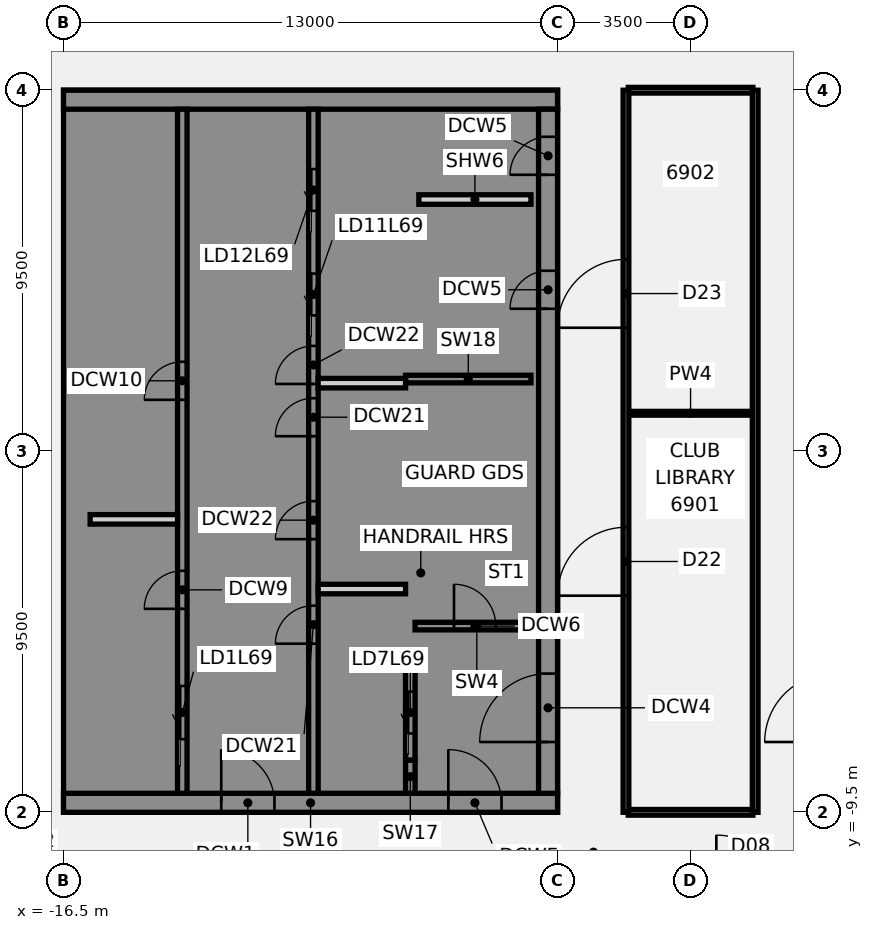
"""IFC4 building model, lengths in metres.
Left out: names, types, materials, properties, quantities, classifications, styles, units other than length and angle.
Written with IfcOpenShell. Run it as: python <this file> out.ifc"""

import sys

from ifc_helpers import new_model, si_unit, direction, frame, frame_2d, origin, place, context, subcontext, project, spatial, polyline, rectangle, outline, extrude, element, fill, save


model = new_model("IFC4")
c1 = context("Model", 3, precision=1e-05, world=origin(), true_north=direction((0.0, 1.0)))
c2 = subcontext(c1, "Body", "Model", "MODEL_VIEW")
j1 = project(units=[si_unit("LENGTHUNIT", "METRE"), si_unit("PLANEANGLEUNIT", "RADIAN")], contexts=[c1])
p1 = place(None, origin())
s1 = spatial("IfcSite", under=j1, at=p1, CompositionType="ELEMENT")
p2 = place(p1, origin())
s2 = spatial("IfcBuilding", under=s1, at=p2, CompositionType="ELEMENT")
p3 = place(p2, frame((0.0, 0.0, 271.2)))
s3 = spatial("IfcBuildingStorey", under=s2, at=p3, CompositionType="ELEMENT", Elevation=271.2)
p4 = place(p3, frame((-1.64, -9.5, 0.0), z_axis=(0.0, 0.0, 1.0), x_axis=(1.0, 0.0, 0.0)))
e1 = element("IfcWall", 1, at=p4, inside=s3, PredefinedType="PARTITIONING", context=c2, shape_type="SweptSolid", body=[
    extrude(rectangle(XDim=3.28, YDim=0.15, at=frame_2d((1.64, 0.0))), origin(), (0.0, 0.0, 1.0), 2.864),
])
p5 = place(p3, frame((-1.64, 1.0, 0.0), z_axis=(0.0, 0.0, 1.0), x_axis=(1.0, 0.0, 0.0)))
e2 = element("IfcWall", 2, at=p5, inside=s3, PredefinedType="PARTITIONING", context=c2, shape_type="SweptSolid", body=[
    extrude(rectangle(XDim=3.28, YDim=0.1, at=frame_2d((1.64, 0.0))), origin(), (0.0, 0.0, 1.0), 2.864),
])
p6 = place(p3, frame((-1.64, 9.5, 0.0), z_axis=(0.0, 0.0, 1.0), x_axis=(1.0, 0.0, 0.0)))
e3 = element("IfcWall", 3, at=p6, inside=s3, PredefinedType="PARTITIONING", context=c2, shape_type="SweptSolid", body=[
    extrude(rectangle(XDim=3.28, YDim=0.15, at=frame_2d((1.64, 0.0))), origin(), (0.0, 0.0, 1.0), 2.864),
])
p7 = place(p3, frame((-1.7, -9.5, 0.0), z_axis=(0.0, 0.0, 1.0), x_axis=(0.0, 1.0, 0.0)))
e4 = element("IfcWall", 4, at=p7, inside=s3, PredefinedType="PARTITIONING", context=c2, shape_type="SweptSolid", body=[
    extrude(rectangle(XDim=19.0, YDim=0.15, at=frame_2d((9.5, 0.0))), origin(), (0.0, 0.0, 1.0), 2.864),
])
p8 = place(p7, frame((5.7, 0.0, 0.0)))
e5 = element("IfcOpeningElement", 5, at=p8, cuts=e4, PredefinedType="OPENING", context=c2, shape_type="SweptSolid", body=[
    extrude(rectangle(XDim=1.8, YDim=2.1, at=frame_2d((0.9, 1.05))), frame((0.0, 0.085, 0.0), z_axis=(0.0, -1.0, 0.0), x_axis=(1.0, 0.0, 0.0)), (0.0, 0.0, 1.0), 0.17),
])
p9 = place(p7, frame((12.75, 0.0, 0.0)))
e6 = element("IfcOpeningElement", 6, at=p9, cuts=e4, PredefinedType="OPENING", context=c2, shape_type="SweptSolid", body=[
    extrude(rectangle(XDim=1.8, YDim=2.1, at=frame_2d((0.9, 1.05))), frame((0.0, 0.085, 0.0), z_axis=(0.0, -1.0, 0.0), x_axis=(1.0, 0.0, 0.0)), (0.0, 0.0, 1.0), 0.17),
])
p10 = place(p3, frame((1.7, -9.5, 0.0), z_axis=(0.0, 0.0, 1.0), x_axis=(0.0, 1.0, 0.0)))
e7 = element("IfcWall", 7, at=p10, inside=s3, PredefinedType="PARTITIONING", context=c2, shape_type="SweptSolid", body=[
    extrude(rectangle(XDim=19.0, YDim=0.15, at=frame_2d((9.5, 0.0))), origin(), (0.0, 0.0, 1.0), 2.864),
])
p11 = place(p3, frame((-16.5, -9.25, 0.0), z_axis=(0.0, 0.0, 1.0), x_axis=(1.0, 0.0, 0.0)))
e8 = element("IfcWall", 8, at=p11, inside=s3, PredefinedType="SHEAR", context=c2, shape_type="SweptSolid", body=[
    extrude(rectangle(XDim=13.0, YDim=0.5, at=frame_2d((6.5, 0.0))), origin(), (0.0, 0.0, 1.0), 3.46),
])
p12 = place(p11, frame((4.15, 0.0, 0.0)))
e9 = element("IfcOpeningElement", 9, at=p12, cuts=e8, PredefinedType="OPENING", context=c2, shape_type="SweptSolid", body=[
    extrude(rectangle(XDim=1.4, YDim=2.1, at=frame_2d((0.7, 1.05))), frame((0.0, 0.26, 0.0), z_axis=(0.0, -1.0, 0.0), x_axis=(1.0, 0.0, 0.0)), (0.0, 0.0, 1.0), 0.52),
])
p13 = place(p11, frame((10.125, 0.0, 0.0)))
e10 = element("IfcOpeningElement", 10, at=p13, cuts=e8, PredefinedType="OPENING", context=c2, shape_type="SweptSolid", body=[
    extrude(rectangle(XDim=1.4, YDim=2.1, at=frame_2d((0.7, 1.05))), frame((0.0, 0.26, 0.0), z_axis=(0.0, -1.0, 0.0), x_axis=(1.0, 0.0, 0.0)), (0.0, 0.0, 1.0), 0.52),
])
p14 = place(p3, origin())
e11 = element("IfcWall", 11, at=p14, inside=s3, PredefinedType="SHEAR", context=c2, shape_type="SweptSolid", body=[
    extrude(outline(polyline([(-13.5, -8.125), (-16.0, -8.125), (-16.0, -5.625), (-13.5, -5.625), (-13.5, -5.375), (-16.0, -5.375), (-16.0, 5.375), (-13.5, 5.375), (-13.5, 5.625), (-16.0, 5.625), (-16.0, 8.125), (-13.5, 8.125), (-13.5, 9.0), (-16.0, 9.0), (-16.5, 9.0), (-16.5, -9.0), (-16.0, -9.0), (-13.5, -9.0), (-13.5, -8.125)])), origin(), (0.0, 0.0, 1.0), 3.46),
])
p15 = place(p3, frame((-16.5, 9.25, 0.0), z_axis=(0.0, 0.0, 1.0), x_axis=(1.0, 0.0, 0.0)))
e12 = element("IfcWall", 12, at=p15, inside=s3, PredefinedType="SHEAR", context=c2, shape_type="SweptSolid", body=[
    extrude(rectangle(XDim=13.0, YDim=0.5, at=frame_2d((6.5, 0.0))), origin(), (0.0, 0.0, 1.0), 3.46),
])
p16 = place(p3, origin())
e13 = element("IfcWall", 13, at=p16, inside=s3, PredefinedType="SHEAR", context=c2, shape_type="SweptSolid", body=[
    extrude(outline(polyline([(-9.8, -5.375), (-9.8, -5.625), (-7.5, -5.625), (-7.25, -5.625), (-7.25, 9.0), (-7.5, 9.0), (-9.8, 9.0), (-9.8, 8.125), (-7.5, 8.125), (-7.5, 5.625), (-9.8, 5.625), (-9.8, 5.375), (-7.5, 5.375), (-7.5, 2.875), (-9.8, 2.875), (-9.8, 2.625), (-7.5, 2.625), (-7.5, -5.375), (-9.8, -5.375)])), origin(), (0.0, 0.0, 1.0), 3.46),
])
p17 = place(p3, origin())
e14 = element("IfcWall", 14, at=p17, inside=s3, PredefinedType="SHEAR", context=c2, shape_type="SweptSolid", body=[
    extrude(outline(polyline([(-7.5, -8.125), (-9.55, -8.125), (-9.55, -5.625), (-9.8, -5.625), (-9.8, -8.125), (-9.8, -9.0), (-7.5, -9.0), (-7.5, -8.125)])), origin(), (0.0, 0.0, 1.0), 3.46),
])
p18 = place(p3, frame((-7.375, -9.0, 0.0), z_axis=(0.0, 0.0, 1.0), x_axis=(0.0, 1.0, 0.0)))
e15 = element("IfcWall", 15, at=p18, inside=s3, PredefinedType="SHEAR", context=c2, shape_type="SweptSolid", body=[
    extrude(rectangle(XDim=0.875, YDim=0.25, at=frame_2d((0.438, 0.0))), origin(), (0.0, 0.0, 1.0), 3.46),
])
p19 = place(p3, frame((-7.5, 1.9, 0.0), z_axis=(0.0, 0.0, 1.0), x_axis=(1.0, 0.0, 0.0)))
e16 = element("IfcWall", 16, at=p19, inside=s3, PredefinedType="SHEAR", context=c2, shape_type="SweptSolid", body=[
    extrude(rectangle(XDim=3.3, YDim=0.2, at=frame_2d((1.65, 0.0))), origin(), (0.0, 0.0, 1.0), 3.46),
])
p20 = place(p3, frame((-13.375, -9.0, 0.0), z_axis=(0.0, 0.0, 1.0), x_axis=(0.0, 1.0, 0.0)))
e17 = element("IfcWall", 17, at=p20, inside=s3, PredefinedType="SHEAR", context=c2, shape_type="SweptSolid", body=[
    extrude(rectangle(XDim=18.0, YDim=0.25, at=frame_2d((9.0, 0.0))), origin(), (0.0, 0.0, 1.0), 3.46),
])
p21 = place(p20, frame((1.425, 0.0, 0.0)))
e18 = element("IfcOpeningElement", 18, at=p21, cuts=e17, PredefinedType="OPENING", context=c2, shape_type="SweptSolid", body=[
    extrude(rectangle(XDim=1.4, YDim=2.1, at=frame_2d((0.7, 1.05))), frame((0.0, 0.135, 0.0), z_axis=(0.0, -1.0, 0.0), x_axis=(1.0, 0.0, 0.0)), (0.0, 0.0, 1.0), 0.27),
])
p22 = place(p20, frame((4.854, 0.0, 0.0)))
e19 = element("IfcOpeningElement", 19, at=p22, cuts=e17, PredefinedType="OPENING", context=c2, shape_type="SweptSolid", body=[
    extrude(rectangle(XDim=1.0, YDim=2.1, at=frame_2d((0.5, 1.05))), frame((0.0, 0.135, 0.0), z_axis=(0.0, -1.0, 0.0), x_axis=(1.0, 0.0, 0.0)), (0.0, 0.0, 1.0), 0.27),
])
p23 = place(p20, frame((10.354, 0.0, 0.0)))
e20 = element("IfcOpeningElement", 20, at=p23, cuts=e17, PredefinedType="OPENING", context=c2, shape_type="SweptSolid", body=[
    extrude(rectangle(XDim=1.0, YDim=2.1, at=frame_2d((0.5, 1.05))), frame((0.0, 0.135, 0.0), z_axis=(0.0, -1.0, 0.0), x_axis=(1.0, 0.0, 0.0)), (0.0, 0.0, 1.0), 0.27),
])
p24 = place(p3, frame((-9.925, -9.0, 0.0), z_axis=(0.0, 0.0, 1.0), x_axis=(0.0, 1.0, 0.0)))
e21 = element("IfcWall", 21, at=p24, inside=s3, PredefinedType="SHEAR", context=c2, shape_type="SweptSolid", body=[
    extrude(rectangle(XDim=18.0, YDim=0.25, at=frame_2d((9.0, 0.0))), origin(), (0.0, 0.0, 1.0), 3.46),
])
p25 = place(p24, frame((12.575, 0.0, 0.0)))
e22 = element("IfcOpeningElement", 22, at=p25, cuts=e21, PredefinedType="OPENING", context=c2, shape_type="SweptSolid", body=[
    extrude(rectangle(XDim=1.1, YDim=2.1, at=frame_2d((0.55, 1.05))), frame((0.0, 0.135, 0.0), z_axis=(0.0, -1.0, 0.0), x_axis=(1.0, 0.0, 0.0)), (0.0, 0.0, 1.0), 0.27),
])
p26 = place(p24, frame((15.325, 0.0, 0.0)))
e23 = element("IfcOpeningElement", 23, at=p26, cuts=e21, PredefinedType="OPENING", context=c2, shape_type="SweptSolid", body=[
    extrude(rectangle(XDim=1.1, YDim=2.1, at=frame_2d((0.55, 1.05))), frame((0.0, 0.135, 0.0), z_axis=(0.0, -1.0, 0.0), x_axis=(1.0, 0.0, 0.0)), (0.0, 0.0, 1.0), 0.27),
])
p27 = place(p24, frame((3.938, 0.0, 0.0)))
e24 = element("IfcOpeningElement", 24, at=p27, cuts=e21, PredefinedType="OPENING", context=c2, shape_type="SweptSolid", body=[
    extrude(rectangle(XDim=1.0, YDim=2.1, at=frame_2d((0.5, 1.05))), frame((0.0, 0.135, 0.0), z_axis=(0.0, -1.0, 0.0), x_axis=(1.0, 0.0, 0.0)), (0.0, 0.0, 1.0), 0.27),
])
p28 = place(p24, frame((6.688, 0.0, 0.0)))
e25 = element("IfcOpeningElement", 25, at=p28, cuts=e21, PredefinedType="OPENING", context=c2, shape_type="SweptSolid", body=[
    extrude(rectangle(XDim=1.0, YDim=2.1, at=frame_2d((0.5, 1.05))), frame((0.0, 0.135, 0.0), z_axis=(0.0, -1.0, 0.0), x_axis=(1.0, 0.0, 0.0)), (0.0, 0.0, 1.0), 0.27),
])
p29 = place(p24, frame((9.396, 0.0, 0.0)))
e26 = element("IfcOpeningElement", 26, at=p29, cuts=e21, PredefinedType="OPENING", context=c2, shape_type="SweptSolid", body=[
    extrude(rectangle(XDim=1.0, YDim=2.1, at=frame_2d((0.5, 1.05))), frame((0.0, 0.135, 0.0), z_axis=(0.0, -1.0, 0.0), x_axis=(1.0, 0.0, 0.0)), (0.0, 0.0, 1.0), 0.27),
])
p30 = place(p24, frame((10.771, 0.0, 0.0)))
e27 = element("IfcOpeningElement", 27, at=p30, cuts=e21, PredefinedType="OPENING", context=c2, shape_type="SweptSolid", body=[
    extrude(rectangle(XDim=1.0, YDim=2.1, at=frame_2d((0.5, 1.05))), frame((0.0, 0.135, 0.0), z_axis=(0.0, -1.0, 0.0), x_axis=(1.0, 0.0, 0.0)), (0.0, 0.0, 1.0), 0.27),
])
p31 = place(p3, frame((-7.375, -8.125, 0.0), z_axis=(0.0, 0.0, 1.0), x_axis=(0.0, 1.0, 0.0)))
e28 = element("IfcWall", 28, at=p31, inside=s3, PredefinedType="SHEAR", context=c2, shape_type="SweptSolid", body=[
    extrude(rectangle(XDim=2.5, YDim=0.25, at=frame_2d((1.25, 0.0))), origin(), (0.0, 0.0, 1.0), 3.46),
])
p32 = place(p31, frame((0.7, 0.0, 0.0)))
e29 = element("IfcOpeningElement", 29, at=p32, cuts=e28, PredefinedType="OPENING", context=c2, shape_type="SweptSolid", body=[
    extrude(rectangle(XDim=1.1, YDim=2.1, at=frame_2d((0.55, 1.05))), frame((0.0, 0.135, 0.0), z_axis=(0.0, -1.0, 0.0), x_axis=(1.0, 0.0, 0.0)), (0.0, 0.0, 1.0), 0.27),
])
p33 = place(p3, frame((-3.75, -9.0, 0.0), z_axis=(0.0, 0.0, 1.0), x_axis=(0.0, 1.0, 0.0)))
e30 = element("IfcWall", 30, at=p33, inside=s3, PredefinedType="SHEAR", context=c2, shape_type="SweptSolid", body=[
    extrude(rectangle(XDim=18.0, YDim=0.5, at=frame_2d((9.0, 0.0))), origin(), (0.0, 0.0, 1.0), 3.46),
])
p34 = place(p33, frame((1.35, 0.0, 0.0)))
e31 = element("IfcOpeningElement", 31, at=p34, cuts=e30, PredefinedType="OPENING", context=c2, shape_type="SweptSolid", body=[
    extrude(rectangle(XDim=1.8, YDim=2.1, at=frame_2d((0.9, 1.05))), frame((0.0, 0.26, 0.0), z_axis=(0.0, -1.0, 0.0), x_axis=(1.0, 0.0, 0.0)), (0.0, 0.0, 1.0), 0.52),
])
p35 = place(p33, frame((12.75, 0.0, 0.0)))
e32 = element("IfcOpeningElement", 32, at=p35, cuts=e30, PredefinedType="OPENING", context=c2, shape_type="SweptSolid", body=[
    extrude(rectangle(XDim=1.0, YDim=2.1, at=frame_2d((0.5, 1.05))), frame((0.0, 0.26, 0.0), z_axis=(0.0, -1.0, 0.0), x_axis=(1.0, 0.0, 0.0)), (0.0, 0.0, 1.0), 0.52),
])
p36 = place(p33, frame((16.274, 0.0, 0.0)))
e33 = element("IfcOpeningElement", 33, at=p36, cuts=e30, PredefinedType="OPENING", context=c2, shape_type="SweptSolid", body=[
    extrude(rectangle(XDim=1.0, YDim=2.1, at=frame_2d((0.5, 1.05))), frame((0.0, 0.26, 0.0), z_axis=(0.0, -1.0, 0.0), x_axis=(1.0, 0.0, 0.0)), (0.0, 0.0, 1.0), 0.52),
])
p37 = place(p3, frame((-7.15, 6.624, 0.0), z_axis=(0.0, 0.0, 1.0), x_axis=(1.0, 0.0, 0.0)))
e34 = element("IfcWall", 34, at=p37, inside=s3, PredefinedType="PARTITIONING", context=c2, shape_type="SweptSolid", body=[
    extrude(rectangle(XDim=2.95, YDim=0.25, at=frame_2d((1.475, 0.0))), origin(), (0.0, 0.0, 1.0), 3.46),
])
p38 = place(p3, frame((-7.25, -4.6, 0.0), z_axis=(0.0, 0.0, 1.0), x_axis=(1.0, 0.0, 0.0)))
e35 = element("IfcWall", 35, at=p38, inside=s3, PredefinedType="SHEAR", context=c2, shape_type="SweptSolid", body=[
    extrude(rectangle(XDim=3.25, YDim=0.2, at=frame_2d((1.625, 0.0))), origin(), (0.0, 0.0, 1.0), 3.46),
])
p39 = place(p38, frame((1.025, 0.0, 0.0)))
e36 = element("IfcOpeningElement", 36, at=p39, cuts=e35, PredefinedType="OPENING", context=c2, shape_type="SweptSolid", body=[
    extrude(rectangle(XDim=1.1, YDim=2.1, at=frame_2d((0.55, 1.05))), frame((0.0, 0.11, 0.0), z_axis=(0.0, -1.0, 0.0), x_axis=(1.0, 0.0, 0.0)), (0.0, 0.0, 1.0), 0.22),
])
for number, where, z_axis, x_axis in (
    (37, (-15.8, -1.792, 0.0), (0.0, 0.0, 1.0), (1.0, 0.0, 0.0)),
    (38, (-9.8, -3.625, 0.0), (0.0, 0.0, 1.0), (1.0, 0.0, 0.0)),
    (39, (-9.8, 1.792, 0.0), (0.0, 0.0, 1.0), (1.0, 0.0, 0.0)),
):
    element("IfcWall", number, at=place(p3, frame(where, z_axis=z_axis, x_axis=x_axis)), inside=s3, PredefinedType="PARTITIONING", context=c2, shape_type="SweptSolid", body=[
        extrude(rectangle(XDim=2.3, YDim=0.25, at=frame_2d((1.15, 0.0))), origin(), (0.0, 0.0, 1.0), 3.46),
    ])
p40 = place(p8, frame((1.8, 0.0, 0.0), z_axis=(0.0, 0.0, 1.0), x_axis=(-1.0, 0.0, 0.0)))
e40 = element("IfcDoor", 40, at=p40, inside=s3, OperationType="DOUBLE_DOOR_SINGLE_SWING", PredefinedType="DOOR", context=c2, shape_type="SweptSolid", body=[
    extrude(rectangle(XDim=1.8, YDim=2.1, at=frame_2d((0.9, 1.05))), frame((0.0, 0.025, 0.0), z_axis=(0.0, -1.0, 0.0), x_axis=(1.0, 0.0, 0.0)), (0.0, 0.0, 1.0), 0.05),
])
fill(e5, e40)
p41 = place(p9, frame((1.8, 0.0, 0.0), z_axis=(0.0, 0.0, 1.0), x_axis=(-1.0, 0.0, 0.0)))
e41 = element("IfcDoor", 41, at=p41, inside=s3, OperationType="DOUBLE_DOOR_SINGLE_SWING", PredefinedType="DOOR", context=c2, shape_type="SweptSolid", body=[
    extrude(rectangle(XDim=1.8, YDim=2.1, at=frame_2d((0.9, 1.05))), frame((0.0, 0.025, 0.0), z_axis=(0.0, -1.0, 0.0), x_axis=(1.0, 0.0, 0.0)), (0.0, 0.0, 1.0), 0.05),
])
fill(e6, e41)
p42 = place(p12, origin())
e42 = element("IfcDoor", 42, at=p42, inside=s3, OperationType="SINGLE_SWING_LEFT", PredefinedType="DOOR", context=c2, shape_type="SweptSolid", body=[
    extrude(rectangle(XDim=1.4, YDim=2.1, at=frame_2d((0.7, 1.05))), frame((0.0, 0.025, 0.0), z_axis=(0.0, -1.0, 0.0), x_axis=(1.0, 0.0, 0.0)), (0.0, 0.0, 1.0), 0.05),
])
fill(e9, e42)
p43 = place(p13, origin())
e43 = element("IfcDoor", 43, at=p43, inside=s3, OperationType="SINGLE_SWING_LEFT", PredefinedType="DOOR", context=c2, shape_type="SweptSolid", body=[
    extrude(rectangle(XDim=1.4, YDim=2.1, at=frame_2d((0.7, 1.05))), frame((0.0, 0.025, 0.0), z_axis=(0.0, -1.0, 0.0), x_axis=(1.0, 0.0, 0.0)), (0.0, 0.0, 1.0), 0.05),
])
fill(e10, e43)
p44 = place(p34, origin())
e44 = element("IfcDoor", 44, at=p44, inside=s3, OperationType="SINGLE_SWING_LEFT", PredefinedType="DOOR", context=c2, shape_type="SweptSolid", body=[
    extrude(rectangle(XDim=1.8, YDim=2.1, at=frame_2d((0.9, 1.05))), frame((0.0, 0.025, 0.0), z_axis=(0.0, -1.0, 0.0), x_axis=(1.0, 0.0, 0.0)), (0.0, 0.0, 1.0), 0.05),
])
fill(e31, e44)
p45 = place(p35, origin())
e45 = element("IfcDoor", 45, at=p45, inside=s3, OperationType="SINGLE_SWING_LEFT", PredefinedType="DOOR", context=c2, shape_type="SweptSolid", body=[
    extrude(rectangle(XDim=1.0, YDim=2.1, at=frame_2d((0.5, 1.05))), frame((0.0, 0.225, 0.0), z_axis=(0.0, -1.0, 0.0), x_axis=(1.0, 0.0, 0.0)), (0.0, 0.0, 1.0), 0.05),
])
fill(e32, e45)
p46 = place(p36, origin())
e46 = element("IfcDoor", 46, at=p46, inside=s3, OperationType="SINGLE_SWING_LEFT", PredefinedType="DOOR", context=c2, shape_type="SweptSolid", body=[
    extrude(rectangle(XDim=1.0, YDim=2.1, at=frame_2d((0.5, 1.05))), frame((0.0, 0.225, 0.0), z_axis=(0.0, -1.0, 0.0), x_axis=(1.0, 0.0, 0.0)), (0.0, 0.0, 1.0), 0.05),
])
fill(e33, e46)
p47 = place(p39, origin())
e47 = element("IfcDoor", 47, at=p47, inside=s3, OperationType="SINGLE_SWING_LEFT", PredefinedType="DOOR", context=c2, shape_type="SweptSolid", body=[
    extrude(rectangle(XDim=1.1, YDim=2.1, at=frame_2d((0.55, 1.05))), frame((0.0, 0.025, 0.0), z_axis=(0.0, -1.0, 0.0), x_axis=(1.0, 0.0, 0.0)), (0.0, 0.0, 1.0), 0.05),
])
fill(e36, e47)
p48 = place(p21, origin())
e48 = element("IfcDoor", 48, at=p48, inside=s3, OperationType="SLIDING_TO_LEFT", PredefinedType="DOOR", context=c2, shape_type="SweptSolid", body=[
    extrude(rectangle(XDim=1.4, YDim=2.1, at=frame_2d((0.7, 1.05))), frame((0.0, 0.025, 0.0), z_axis=(0.0, -1.0, 0.0), x_axis=(1.0, 0.0, 0.0)), (0.0, 0.0, 1.0), 0.05),
])
fill(e18, e48)
p49 = place(p32, origin())
e49 = element("IfcDoor", 49, at=p49, inside=s3, OperationType="SLIDING_TO_LEFT", PredefinedType="DOOR", context=c2, shape_type="SweptSolid", body=[
    extrude(rectangle(XDim=1.1, YDim=2.1, at=frame_2d((0.55, 1.05))), frame((0.0, 0.025, 0.0), z_axis=(0.0, -1.0, 0.0), x_axis=(1.0, 0.0, 0.0)), (0.0, 0.0, 1.0), 0.05),
])
fill(e29, e49)
p50 = place(p25, origin())
e50 = element("IfcDoor", 50, at=p50, inside=s3, OperationType="SLIDING_TO_LEFT", PredefinedType="DOOR", context=c2, shape_type="SweptSolid", body=[
    extrude(rectangle(XDim=1.1, YDim=2.1, at=frame_2d((0.55, 1.05))), frame((0.0, 0.025, 0.0), z_axis=(0.0, -1.0, 0.0), x_axis=(1.0, 0.0, 0.0)), (0.0, 0.0, 1.0), 0.05),
])
fill(e22, e50)
p51 = place(p26, origin())
e51 = element("IfcDoor", 51, at=p51, inside=s3, OperationType="SLIDING_TO_LEFT", PredefinedType="DOOR", context=c2, shape_type="SweptSolid", body=[
    extrude(rectangle(XDim=1.1, YDim=2.1, at=frame_2d((0.55, 1.05))), frame((0.0, 0.025, 0.0), z_axis=(0.0, -1.0, 0.0), x_axis=(1.0, 0.0, 0.0)), (0.0, 0.0, 1.0), 0.05),
])
fill(e23, e51)
p52 = place(p22, origin())
e52 = element("IfcDoor", 52, at=p52, inside=s3, OperationType="SINGLE_SWING_LEFT", PredefinedType="DOOR", context=c2, shape_type="SweptSolid", body=[
    extrude(rectangle(XDim=1.0, YDim=2.1, at=frame_2d((0.5, 1.05))), frame((0.0, 0.025, 0.0), z_axis=(0.0, -1.0, 0.0), x_axis=(1.0, 0.0, 0.0)), (0.0, 0.0, 1.0), 0.05),
])
fill(e19, e52)
p53 = place(p23, origin())
e53 = element("IfcDoor", 53, at=p53, inside=s3, OperationType="SINGLE_SWING_LEFT", PredefinedType="DOOR", context=c2, shape_type="SweptSolid", body=[
    extrude(rectangle(XDim=1.0, YDim=2.1, at=frame_2d((0.5, 1.05))), frame((0.0, 0.025, 0.0), z_axis=(0.0, -1.0, 0.0), x_axis=(1.0, 0.0, 0.0)), (0.0, 0.0, 1.0), 0.05),
])
fill(e20, e53)
p54 = place(p27, origin())
e54 = element("IfcDoor", 54, at=p54, inside=s3, OperationType="SINGLE_SWING_LEFT", PredefinedType="DOOR", context=c2, shape_type="SweptSolid", body=[
    extrude(rectangle(XDim=1.0, YDim=2.1, at=frame_2d((0.5, 1.05))), frame((0.0, 0.025, 0.0), z_axis=(0.0, -1.0, 0.0), x_axis=(1.0, 0.0, 0.0)), (0.0, 0.0, 1.0), 0.05),
])
fill(e24, e54)
p55 = place(p28, origin())
e55 = element("IfcDoor", 55, at=p55, inside=s3, OperationType="SINGLE_SWING_LEFT", PredefinedType="DOOR", context=c2, shape_type="SweptSolid", body=[
    extrude(rectangle(XDim=1.0, YDim=2.1, at=frame_2d((0.5, 1.05))), frame((0.0, 0.025, 0.0), z_axis=(0.0, -1.0, 0.0), x_axis=(1.0, 0.0, 0.0)), (0.0, 0.0, 1.0), 0.05),
])
fill(e25, e55)
p56 = place(p29, origin())
e56 = element("IfcDoor", 56, at=p56, inside=s3, OperationType="SINGLE_SWING_LEFT", PredefinedType="DOOR", context=c2, shape_type="SweptSolid", body=[
    extrude(rectangle(XDim=1.0, YDim=2.1, at=frame_2d((0.5, 1.05))), frame((0.0, 0.025, 0.0), z_axis=(0.0, -1.0, 0.0), x_axis=(1.0, 0.0, 0.0)), (0.0, 0.0, 1.0), 0.05),
])
fill(e26, e56)
p57 = place(p30, origin())
e57 = element("IfcDoor", 57, at=p57, inside=s3, OperationType="SINGLE_SWING_LEFT", PredefinedType="DOOR", context=c2, shape_type="SweptSolid", body=[
    extrude(rectangle(XDim=1.0, YDim=2.1, at=frame_2d((0.5, 1.05))), frame((0.0, 0.025, 0.0), z_axis=(0.0, -1.0, 0.0), x_axis=(1.0, 0.0, 0.0)), (0.0, 0.0, 1.0), 0.05),
])
fill(e27, e57)
save(model, sys.argv[1])
